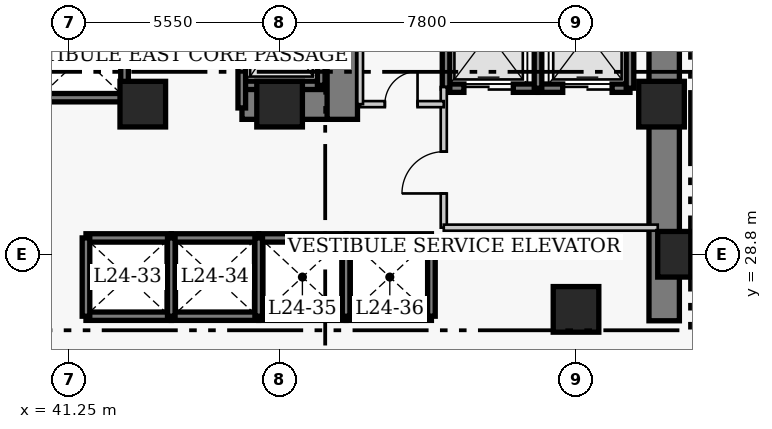
"""IFC4 building model, lengths in metres.
Left out: names, types, materials, properties, quantities, classifications, styles, units other than length and angle.
Written with IfcOpenShell. Run it as: python <this file> out.ifc"""

import sys

from ifc_helpers import new_model, si_unit, direction, frame, frame_2d, origin, origin_2d, place, context, subcontext, project, spatial, rectangle, extrude, element, fill, save


model = new_model("IFC4")
c1 = context("Model", 3, precision=1e-05, world=origin(), true_north=direction((0.0, 1.0)))
c2 = subcontext(c1, "Body", "Model", "MODEL_VIEW")
j1 = project(units=[si_unit("LENGTHUNIT", "METRE"), si_unit("PLANEANGLEUNIT", "RADIAN")], contexts=[c1])
p1 = place(None, origin())
s1 = spatial("IfcSite", under=j1, at=p1, CompositionType="ELEMENT")
p2 = place(p1, origin())
s2 = spatial("IfcBuilding", under=s1, at=p2, CompositionType="ELEMENT")
p3 = place(p2, frame((0.0, 0.0, 99.4)))
s3 = spatial("IfcBuildingStorey", under=s2, at=p3, CompositionType="ELEMENT", Elevation=99.4)
p4 = place(p3, frame((56.92, 27.05, 0.0), z_axis=(0.0, 0.0, 1.0), x_axis=(0.0, 1.0, 0.0)))
e1 = element("IfcWall", 1, at=p4, inside=s3, PredefinedType="SHEAR", context=c2, shape_type="SweptSolid", body=[
    extrude(rectangle(XDim=13.67, YDim=0.8, at=frame_2d((6.835, 0.0))), origin(), (0.0, 0.0, 1.0), 3.8),
])
p5 = place(p3, frame((45.81, 32.75, 0.0), z_axis=(0.0, 0.0, 1.0), x_axis=(1.0, 0.0, 0.0)))
e2 = element("IfcWall", 2, at=p5, inside=s3, PredefinedType="SHEAR", context=c2, shape_type="SweptSolid", body=[
    extrude(rectangle(XDim=2.64, YDim=0.8, at=frame_2d((1.32, 0.0))), origin(), (0.0, 0.0, 1.0), 3.8),
])
p6 = place(p3, frame((48.45, 32.35, 0.0), z_axis=(0.0, 0.0, 1.0), x_axis=(0.0, 1.0, 0.0)))
e3 = element("IfcWall", 3, at=p6, inside=s3, PredefinedType="SHEAR", context=c2, shape_type="SweptSolid", body=[
    extrude(rectangle(XDim=7.97, YDim=0.8, at=frame_2d((3.985, 0.0))), origin(), (0.0, 0.0, 1.0), 3.8),
])
p7 = place(p6, frame((5.85, 0.0, 0.0)))
e4 = element("IfcOpeningElement", 4, at=p7, cuts=e3, PredefinedType="OPENING", context=c2, shape_type="SweptSolid", body=[
    extrude(rectangle(XDim=1.1, YDim=2.15, at=frame_2d((0.55, 1.075))), frame((0.0, 0.41, 0.0), z_axis=(0.0, -1.0, 0.0), x_axis=(1.0, 0.0, 0.0)), (0.0, 0.0, 1.0), 0.82),
])
for number, where, z_axis, x_axis in (
    (5, (57.35, 28.8, 0.0), (0.0, 0.0, 1.0), (1.0, 0.0, 0.0)),
    (6, (43.2, 32.75, 0.0), (0.0, 0.0, 1.0), (1.0, 0.0, 0.0)),
    (7, (46.8, 32.75, 0.0), (0.0, 0.0, 1.0), (1.0, 0.0, 0.0)),
    (8, (54.6, 27.35, 0.0), (0.0, 0.0, 1.0), (1.0, 0.0, 0.0)),
    (9, (56.85, 32.75, 0.0), (0.0, 0.0, 1.0), (1.0, 0.0, 0.0)),
):
    element("IfcColumn", number, at=place(p3, frame(where, z_axis=z_axis, x_axis=x_axis)), inside=s3, PredefinedType="COLUMN", context=c2, shape_type="SweptSolid", body=[
        extrude(rectangle(XDim=1.2, YDim=1.2, at=origin_2d()), origin(), (0.0, 0.0, 1.0), 3.8),
    ])
for number, where, z_axis, x_axis in (
    (10, (41.705, 29.23, 0.0), (0.0, 0.0, 1.0), (1.0, 0.0, 0.0)),
    (11, (41.705, 27.17, 0.0), (0.0, 0.0, 1.0), (1.0, 0.0, 0.0)),
):
    element("IfcWall", number, at=place(p3, frame(where, z_axis=z_axis, x_axis=x_axis)), inside=s3, PredefinedType="SHEAR", context=c2, shape_type="SweptSolid", body=[
        extrude(rectangle(XDim=2.245, YDim=0.22, at=frame_2d((1.123, 0.0))), origin(), (0.0, 0.0, 1.0), 3.8),
    ])
p8 = place(p3, frame((41.705, 27.17, 0.0), z_axis=(0.0, 0.0, 1.0), x_axis=(0.0, 1.0, 0.0)))
e12 = element("IfcWall", 12, at=p8, inside=s3, PredefinedType="SHEAR", context=c2, shape_type="SweptSolid", body=[
    extrude(rectangle(XDim=2.06, YDim=0.2, at=frame_2d((1.03, 0.0))), origin(), (0.0, 0.0, 1.0), 3.8),
])
for number, where, z_axis, x_axis in (
    (13, (43.95, 29.23, 0.0), (0.0, 0.0, 1.0), (1.0, 0.0, 0.0)),
    (14, (43.95, 27.17, 0.0), (0.0, 0.0, 1.0), (1.0, 0.0, 0.0)),
):
    element("IfcWall", number, at=place(p3, frame(where, z_axis=z_axis, x_axis=x_axis)), inside=s3, PredefinedType="SHEAR", context=c2, shape_type="SweptSolid", body=[
        extrude(rectangle(XDim=2.3, YDim=0.22, at=frame_2d((1.15, 0.0))), origin(), (0.0, 0.0, 1.0), 3.8),
    ])
p9 = place(p3, frame((43.95, 27.17, 0.0), z_axis=(0.0, 0.0, 1.0), x_axis=(0.0, 1.0, 0.0)))
e15 = element("IfcWall", 15, at=p9, inside=s3, PredefinedType="SHEAR", context=c2, shape_type="SweptSolid", body=[
    extrude(rectangle(XDim=2.06, YDim=0.2, at=frame_2d((1.03, 0.0))), origin(), (0.0, 0.0, 1.0), 3.8),
])
for number, where, z_axis, x_axis in (
    (16, (46.25, 29.23, 0.0), (0.0, 0.0, 1.0), (1.0, 0.0, 0.0)),
    (17, (46.25, 27.17, 0.0), (0.0, 0.0, 1.0), (1.0, 0.0, 0.0)),
):
    element("IfcWall", number, at=place(p3, frame(where, z_axis=z_axis, x_axis=x_axis)), inside=s3, PredefinedType="SHEAR", context=c2, shape_type="SweptSolid", body=[
        extrude(rectangle(XDim=2.3, YDim=0.22, at=frame_2d((1.15, 0.0))), origin(), (0.0, 0.0, 1.0), 3.8),
    ])
p10 = place(p3, frame((46.25, 27.17, 0.0), z_axis=(0.0, 0.0, 1.0), x_axis=(0.0, 1.0, 0.0)))
e18 = element("IfcWall", 18, at=p10, inside=s3, PredefinedType="SHEAR", context=c2, shape_type="SweptSolid", body=[
    extrude(rectangle(XDim=2.06, YDim=0.2, at=frame_2d((1.03, 0.0))), origin(), (0.0, 0.0, 1.0), 3.8),
])
for number, where, z_axis, x_axis in (
    (19, (48.55, 29.23, 0.0), (0.0, 0.0, 1.0), (1.0, 0.0, 0.0)),
    (20, (48.55, 27.17, 0.0), (0.0, 0.0, 1.0), (1.0, 0.0, 0.0)),
):
    element("IfcWall", number, at=place(p3, frame(where, z_axis=z_axis, x_axis=x_axis)), inside=s3, PredefinedType="SHEAR", context=c2, shape_type="SweptSolid", body=[
        extrude(rectangle(XDim=2.245, YDim=0.22, at=frame_2d((1.123, 0.0))), origin(), (0.0, 0.0, 1.0), 3.8),
    ])
for number, where, z_axis, x_axis in (
    (21, (48.55, 27.17, 0.0), (0.0, 0.0, 1.0), (0.0, 1.0, 0.0)),
    (22, (50.795, 27.17, 0.0), (0.0, 0.0, 1.0), (0.0, 1.0, 0.0)),
):
    element("IfcWall", number, at=place(p3, frame(where, z_axis=z_axis, x_axis=x_axis)), inside=s3, PredefinedType="SHEAR", context=c2, shape_type="SweptSolid", body=[
        extrude(rectangle(XDim=2.06, YDim=0.2, at=frame_2d((1.03, 0.0))), origin(), (0.0, 0.0, 1.0), 3.8),
    ])
p11 = place(p3, frame((40.4, 32.92, 0.0), z_axis=(0.0, 0.0, 1.0), x_axis=(1.0, 0.0, 0.0)))
e23 = element("IfcWall", 23, at=p11, inside=s3, PredefinedType="SHEAR", context=c2, shape_type="SweptSolid", body=[
    extrude(rectangle(XDim=2.32, YDim=0.22, at=frame_2d((1.16, 0.0))), origin(), (0.0, 0.0, 1.0), 3.8),
])
p12 = place(p3, frame((42.72, 32.92, 0.0), z_axis=(0.0, 0.0, 1.0), x_axis=(0.0, 1.0, 0.0)))
e24 = element("IfcWall", 24, at=p12, inside=s3, PredefinedType="SHEAR", context=c2, shape_type="SweptSolid", body=[
    extrude(rectangle(XDim=2.16, YDim=0.2, at=frame_2d((1.08, 0.0))), origin(), (0.0, 0.0, 1.0), 3.8),
])
p13 = place(p3, frame((51.18, 33.17, 0.0), z_axis=(0.0, 0.0, 1.0), x_axis=(1.0, 0.0, 0.0)))
e25 = element("IfcWall", 25, at=p13, inside=s3, PredefinedType="SHEAR", context=c2, shape_type="SweptSolid", body=[
    extrude(rectangle(XDim=2.42, YDim=0.22, at=frame_2d((1.21, 0.0))), origin(), (0.0, 0.0, 1.0), 3.8),
])
p14 = place(p13, frame((0.47, 0.0, 0.0)))
e26 = element("IfcOpeningElement", 26, at=p14, cuts=e25, PredefinedType="OPENING", context=c2, shape_type="SweptSolid", body=[
    extrude(rectangle(XDim=1.3, YDim=2.15, at=frame_2d((0.65, 1.075))), frame((0.0, 0.12, 0.0), z_axis=(0.0, -1.0, 0.0), x_axis=(1.0, 0.0, 0.0)), (0.0, 0.0, 1.0), 0.24),
])
p15 = place(p3, frame((51.18, 33.17, 0.0), z_axis=(0.0, 0.0, 1.0), x_axis=(0.0, 1.0, 0.0)))
e27 = element("IfcWall", 27, at=p15, inside=s3, PredefinedType="SHEAR", context=c2, shape_type="SweptSolid", body=[
    extrude(rectangle(XDim=2.86, YDim=0.2, at=frame_2d((1.43, 0.0))), origin(), (0.0, 0.0, 1.0), 3.8),
])
p16 = place(p3, frame((53.6, 33.17, 0.0), z_axis=(0.0, 0.0, 1.0), x_axis=(1.0, 0.0, 0.0)))
e28 = element("IfcWall", 28, at=p16, inside=s3, PredefinedType="SHEAR", context=c2, shape_type="SweptSolid", body=[
    extrude(rectangle(XDim=2.42, YDim=0.22, at=frame_2d((1.21, 0.0))), origin(), (0.0, 0.0, 1.0), 3.8),
])
p17 = place(p16, frame((0.65, 0.0, 0.0)))
e29 = element("IfcOpeningElement", 29, at=p17, cuts=e28, PredefinedType="OPENING", context=c2, shape_type="SweptSolid", body=[
    extrude(rectangle(XDim=1.3, YDim=2.15, at=frame_2d((0.65, 1.075))), frame((0.0, 0.12, 0.0), z_axis=(0.0, -1.0, 0.0), x_axis=(1.0, 0.0, 0.0)), (0.0, 0.0, 1.0), 0.24),
])
for number, where, z_axis, x_axis in (
    (30, (53.6, 33.17, 0.0), (0.0, 0.0, 1.0), (0.0, 1.0, 0.0)),
    (31, (56.02, 33.17, 0.0), (0.0, 0.0, 1.0), (0.0, 1.0, 0.0)),
):
    element("IfcWall", number, at=place(p3, frame(where, z_axis=z_axis, x_axis=x_axis)), inside=s3, PredefinedType="SHEAR", context=c2, shape_type="SweptSolid", body=[
        extrude(rectangle(XDim=2.86, YDim=0.2, at=frame_2d((1.43, 0.0))), origin(), (0.0, 0.0, 1.0), 3.8),
    ])
p18 = place(p3, frame((45.805, 33.245, 0.0), z_axis=(0.0, 0.0, 1.0), x_axis=(1.0, 0.0, 0.0)))
e32 = element("IfcWall", 32, at=p18, inside=s3, PredefinedType="SHEAR", context=c2, shape_type="SweptSolid", body=[
    extrude(rectangle(XDim=2.09, YDim=0.22, at=frame_2d((1.045, 0.0))), origin(), (0.0, 0.0, 1.0), 3.8),
])
p19 = place(p3, frame((45.805, 32.65, 0.0), z_axis=(0.0, 0.0, 1.0), x_axis=(0.0, 1.0, 0.0)))
e33 = element("IfcWall", 33, at=p19, inside=s3, PredefinedType="SHEAR", context=c2, shape_type="SweptSolid", body=[
    extrude(rectangle(XDim=3.505, YDim=0.2, at=frame_2d((1.752, 0.0))), origin(), (0.0, 0.0, 1.0), 3.8),
])
p20 = place(p3, frame((47.895, 33.245, 0.0), z_axis=(0.0, 0.0, 1.0), x_axis=(0.0, 1.0, 0.0)))
e34 = element("IfcWall", 34, at=p20, inside=s3, PredefinedType="SHEAR", context=c2, shape_type="SweptSolid", body=[
    extrude(rectangle(XDim=2.91, YDim=0.2, at=frame_2d((1.455, 0.0))), origin(), (0.0, 0.0, 1.0), 3.8),
])
p21 = place(p3, frame((51.12, 29.5, 0.0), z_axis=(0.0, 0.0, 1.0), x_axis=(0.0, 1.0, 0.0)))
e35 = element("IfcWall", 35, at=p21, inside=s3, PredefinedType="PARTITIONING", context=c2, shape_type="SweptSolid", body=[
    extrude(rectangle(XDim=3.7, YDim=0.16, at=frame_2d((1.85, 0.0))), origin(), (0.0, 0.0, 1.0), 3.54),
])
p22 = place(p21, frame((0.9, 0.0, 0.0)))
e36 = element("IfcOpeningElement", 36, at=p22, cuts=e35, PredefinedType="OPENING", context=c2, shape_type="SweptSolid", body=[
    extrude(rectangle(XDim=1.1, YDim=2.15, at=frame_2d((0.55, 1.075))), frame((0.0, 0.09, 0.0), z_axis=(0.0, -1.0, 0.0), x_axis=(1.0, 0.0, 0.0)), (0.0, 0.0, 1.0), 0.18),
])
p23 = place(p3, frame((51.12, 29.5, 0.0), z_axis=(0.0, 0.0, 1.0), x_axis=(1.0, 0.0, 0.0)))
e37 = element("IfcWall", 37, at=p23, inside=s3, PredefinedType="PARTITIONING", context=c2, shape_type="SweptSolid", body=[
    extrude(rectangle(XDim=5.63, YDim=0.16, at=frame_2d((2.815, 0.0))), origin(), (0.0, 0.0, 1.0), 3.54),
])
p24 = place(p3, frame((48.92, 32.75, 0.0), z_axis=(0.0, 0.0, 1.0), x_axis=(1.0, 0.0, 0.0)))
e38 = element("IfcWall", 38, at=p24, inside=s3, PredefinedType="PARTITIONING", context=c2, shape_type="SweptSolid", body=[
    extrude(rectangle(XDim=2.2, YDim=0.16, at=frame_2d((1.1, 0.0))), origin(), (0.0, 0.0, 1.0), 3.54),
])
p25 = place(p24, frame((0.65, 0.0, 0.0)))
e39 = element("IfcOpeningElement", 39, at=p25, cuts=e38, PredefinedType="OPENING", context=c2, shape_type="SweptSolid", body=[
    extrude(rectangle(XDim=0.86, YDim=2.05, at=frame_2d((0.43, 1.025))), frame((0.0, 0.09, 0.0), z_axis=(0.0, -1.0, 0.0), x_axis=(1.0, 0.0, 0.0)), (0.0, 0.0, 1.0), 0.18),
])
p26 = place(p3, frame((48.92, 32.75, 0.0), z_axis=(0.0, 0.0, 1.0), x_axis=(0.0, 1.0, 0.0)))
e40 = element("IfcWall", 40, at=p26, inside=s3, PredefinedType="PARTITIONING", context=c2, shape_type="SweptSolid", body=[
    extrude(rectangle(XDim=3.62, YDim=0.15, at=frame_2d((1.81, 0.0))), origin(), (0.0, 0.0, 1.0), 3.54),
])
p27 = place(p14, origin())
e41 = element("IfcDoor", 41, at=p27, inside=s3, OperationType="DOUBLE_DOOR_SLIDING", PredefinedType="DOOR", context=c2, shape_type="SweptSolid", body=[
    extrude(rectangle(XDim=1.3, YDim=2.15, at=frame_2d((0.65, 1.075))), frame((0.0, 0.025, 0.0), z_axis=(0.0, -1.0, 0.0), x_axis=(1.0, 0.0, 0.0)), (0.0, 0.0, 1.0), 0.05),
])
fill(e26, e41)
p28 = place(p17, origin())
e42 = element("IfcDoor", 42, at=p28, inside=s3, OperationType="DOUBLE_DOOR_SLIDING", PredefinedType="DOOR", context=c2, shape_type="SweptSolid", body=[
    extrude(rectangle(XDim=1.3, YDim=2.15, at=frame_2d((0.65, 1.075))), frame((0.0, 0.025, 0.0), z_axis=(0.0, -1.0, 0.0), x_axis=(1.0, 0.0, 0.0)), (0.0, 0.0, 1.0), 0.05),
])
fill(e29, e42)
p29 = place(p22, origin())
e43 = element("IfcDoor", 43, at=p29, inside=s3, OperationType="SINGLE_SWING_LEFT", PredefinedType="DOOR", context=c2, shape_type="SweptSolid", body=[
    extrude(rectangle(XDim=1.1, YDim=2.15, at=frame_2d((0.55, 1.075))), frame((0.0, 0.025, 0.0), z_axis=(0.0, -1.0, 0.0), x_axis=(1.0, 0.0, 0.0)), (0.0, 0.0, 1.0), 0.05),
])
fill(e36, e43)
p30 = place(p25, origin())
e44 = element("IfcDoor", 44, at=p30, inside=s3, OperationType="SINGLE_SWING_RIGHT", PredefinedType="DOOR", context=c2, shape_type="SweptSolid", body=[
    extrude(rectangle(XDim=0.86, YDim=2.05, at=frame_2d((0.43, 1.025))), frame((0.0, 0.025, 0.0), z_axis=(0.0, -1.0, 0.0), x_axis=(1.0, 0.0, 0.0)), (0.0, 0.0, 1.0), 0.05),
])
fill(e39, e44)
save(model, sys.argv[1])
